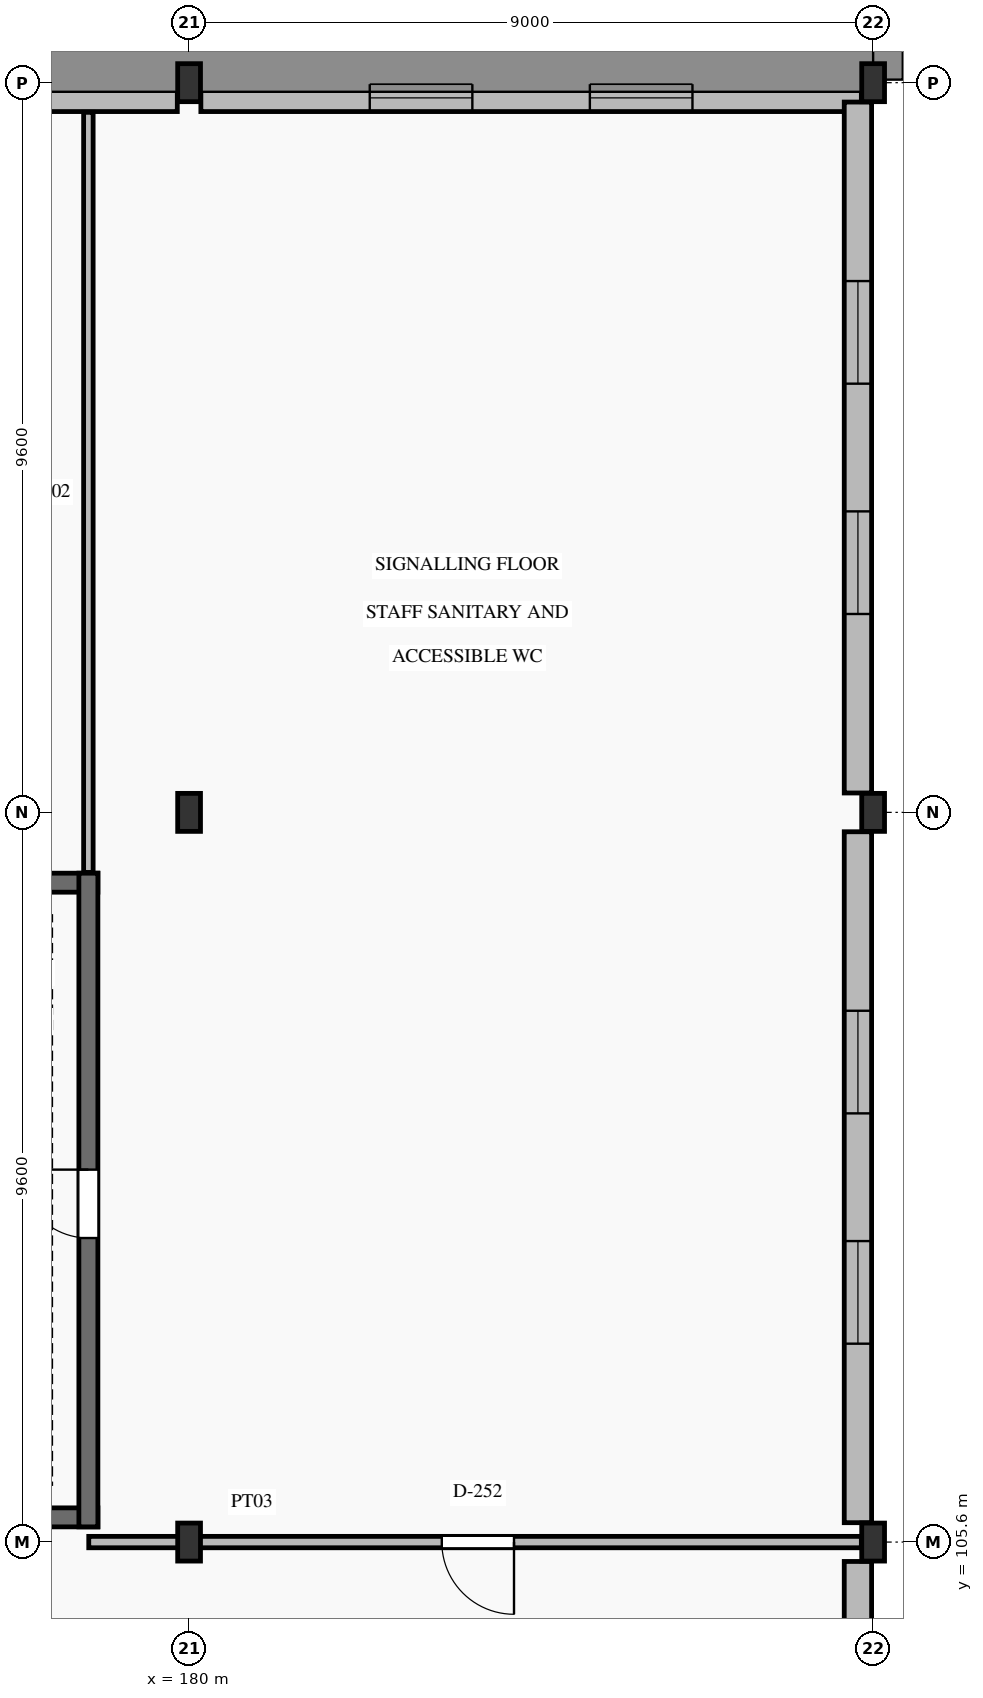
"""IFC4 building model, lengths in metres.
Left out: names, types, materials, properties, quantities, classifications, styles, units other than length and angle.
Written with IfcOpenShell. Run it as: python <this file> out.ifc"""

import sys

from ifc_helpers import new_model, si_unit, direction, frame, frame_2d, origin, origin_2d, place, context, subcontext, project, spatial, rectangle, i_section, extrude, element, fill, save


model = new_model("IFC4")
c1 = context("Model", 3, precision=1e-05, world=origin(), true_north=direction((0.0, 1.0)))
c2 = subcontext(c1, "Body", "Model", "MODEL_VIEW")
j1 = project(units=[si_unit("LENGTHUNIT", "METRE"), si_unit("PLANEANGLEUNIT", "RADIAN")], contexts=[c1])
p1 = place(None, origin())
s1 = spatial("IfcSite", under=j1, at=p1, CompositionType="ELEMENT")
p2 = place(p1, origin())
s2 = spatial("IfcBuilding", under=s1, at=p2, CompositionType="ELEMENT")
p3 = place(p2, frame((0.0, 0.0, 6.0)))
s3 = spatial("IfcBuildingStorey", under=s2, at=p3, CompositionType="ELEMENT", Elevation=6.0)
for number, where, z_axis, x_axis in (
    (1, (180.0, 105.6, 0.0), (0.0, 0.0, 1.0), (1.0, 0.0, 0.0)),
    (2, (180.0, 115.2, 0.0), (0.0, 0.0, 1.0), (1.0, 0.0, 0.0)),
    (3, (180.0, 124.8, 0.0), (0.0, 0.0, 1.0), (1.0, 0.0, 0.0)),
    (4, (189.0, 105.6, 0.0), (0.0, 0.0, 1.0), (1.0, 0.0, 0.0)),
    (5, (189.0, 115.2, 0.0), (0.0, 0.0, 1.0), (1.0, 0.0, 0.0)),
    (6, (189.0, 124.8, 0.0), (0.0, 0.0, 1.0), (1.0, 0.0, 0.0)),
):
    element("IfcColumn", number, at=place(p3, frame(where, z_axis=z_axis, x_axis=x_axis)), inside=s3, PredefinedType="COLUMN", context=c2, shape_type="SweptSolid", body=[
        extrude(i_section(OverallWidth=0.3, OverallDepth=0.5, WebThickness=0.014, FlangeThickness=0.028, FilletRadius=0.027, at=origin_2d()), origin(), (0.0, 0.0, 1.0), 4.8),
    ])
p4 = place(p3, frame((171.155, 124.6, 0.0), z_axis=(0.0, 0.0, 1.0), x_axis=(1.0, 0.0, 0.0)))
e7 = element("IfcWall", 7, at=p4, inside=s3, PredefinedType="SOLIDWALL", context=c2, shape_type="SweptSolid", body=[
    extrude(rectangle(XDim=8.69, YDim=0.36, at=frame_2d((4.345, 0.0))), origin(), (0.0, 0.0, 1.0), 4.23),
])
p5 = place(p4, frame((2.222, 0.0, 0.95)))
e8 = element("IfcOpeningElement", 8, at=p5, cuts=e7, PredefinedType="OPENING", context=c2, shape_type="SweptSolid", body=[
    extrude(rectangle(XDim=1.35, YDim=1.95, at=frame_2d((0.675, 0.975))), frame((0.0, 0.195, 0.0), z_axis=(0.0, -1.0, 0.0), x_axis=(1.0, 0.0, 0.0)), (0.0, 0.0, 1.0), 0.39),
])
p6 = place(p4, frame((5.118, 0.0, 0.95)))
e9 = element("IfcOpeningElement", 9, at=p6, cuts=e7, PredefinedType="OPENING", context=c2, shape_type="SweptSolid", body=[
    extrude(rectangle(XDim=1.35, YDim=1.95, at=frame_2d((0.675, 0.975))), frame((0.0, 0.195, 0.0), z_axis=(0.0, -1.0, 0.0), x_axis=(1.0, 0.0, 0.0)), (0.0, 0.0, 1.0), 0.39),
])
p7 = place(p3, frame((180.155, 124.6, 0.0), z_axis=(0.0, 0.0, 1.0), x_axis=(1.0, 0.0, 0.0)))
e10 = element("IfcWall", 10, at=p7, inside=s3, PredefinedType="SOLIDWALL", context=c2, shape_type="SweptSolid", body=[
    extrude(rectangle(XDim=8.69, YDim=0.36, at=frame_2d((4.345, 0.0))), origin(), (0.0, 0.0, 1.0), 4.23),
])
p8 = place(p7, frame((2.222, 0.0, 0.95)))
e11 = element("IfcOpeningElement", 11, at=p8, cuts=e10, PredefinedType="OPENING", context=c2, shape_type="SweptSolid", body=[
    extrude(rectangle(XDim=1.35, YDim=1.95, at=frame_2d((0.675, 0.975))), frame((0.0, 0.195, 0.0), z_axis=(0.0, -1.0, 0.0), x_axis=(1.0, 0.0, 0.0)), (0.0, 0.0, 1.0), 0.39),
])
p9 = place(p7, frame((5.118, 0.0, 0.95)))
e12 = element("IfcOpeningElement", 12, at=p9, cuts=e10, PredefinedType="OPENING", context=c2, shape_type="SweptSolid", body=[
    extrude(rectangle(XDim=1.35, YDim=1.95, at=frame_2d((0.675, 0.975))), frame((0.0, 0.195, 0.0), z_axis=(0.0, -1.0, 0.0), x_axis=(1.0, 0.0, 0.0)), (0.0, 0.0, 1.0), 0.39),
])
p10 = place(p3, frame((188.8, 96.255, 0.0), z_axis=(0.0, 0.0, 1.0), x_axis=(0.0, 1.0, 0.0)))
e13 = element("IfcWall", 13, at=p10, inside=s3, PredefinedType="SOLIDWALL", context=c2, shape_type="SweptSolid", body=[
    extrude(rectangle(XDim=9.09, YDim=0.36, at=frame_2d((4.545, 0.0))), origin(), (0.0, 0.0, 1.0), 4.28),
])
p11 = place(p10, frame((2.355, 0.0, 0.95)))
e14 = element("IfcOpeningElement", 14, at=p11, cuts=e13, PredefinedType="OPENING", context=c2, shape_type="SweptSolid", body=[
    extrude(rectangle(XDim=1.35, YDim=1.95, at=frame_2d((0.675, 0.975))), frame((0.0, 0.195, 0.0), z_axis=(0.0, -1.0, 0.0), x_axis=(1.0, 0.0, 0.0)), (0.0, 0.0, 1.0), 0.39),
])
p12 = place(p10, frame((5.385, 0.0, 0.95)))
e15 = element("IfcOpeningElement", 15, at=p12, cuts=e13, PredefinedType="OPENING", context=c2, shape_type="SweptSolid", body=[
    extrude(rectangle(XDim=1.35, YDim=1.95, at=frame_2d((0.675, 0.975))), frame((0.0, 0.195, 0.0), z_axis=(0.0, -1.0, 0.0), x_axis=(1.0, 0.0, 0.0)), (0.0, 0.0, 1.0), 0.39),
])
p13 = place(p3, frame((188.8, 105.855, 0.0), z_axis=(0.0, 0.0, 1.0), x_axis=(0.0, 1.0, 0.0)))
e16 = element("IfcWall", 16, at=p13, inside=s3, PredefinedType="SOLIDWALL", context=c2, shape_type="SweptSolid", body=[
    extrude(rectangle(XDim=9.09, YDim=0.36, at=frame_2d((4.545, 0.0))), origin(), (0.0, 0.0, 1.0), 4.28),
])
p14 = place(p13, frame((2.355, 0.0, 0.95)))
e17 = element("IfcOpeningElement", 17, at=p14, cuts=e16, PredefinedType="OPENING", context=c2, shape_type="SweptSolid", body=[
    extrude(rectangle(XDim=1.35, YDim=1.95, at=frame_2d((0.675, 0.975))), frame((0.0, 0.195, 0.0), z_axis=(0.0, -1.0, 0.0), x_axis=(1.0, 0.0, 0.0)), (0.0, 0.0, 1.0), 0.39),
])
p15 = place(p13, frame((5.385, 0.0, 0.95)))
e18 = element("IfcOpeningElement", 18, at=p15, cuts=e16, PredefinedType="OPENING", context=c2, shape_type="SweptSolid", body=[
    extrude(rectangle(XDim=1.35, YDim=1.95, at=frame_2d((0.675, 0.975))), frame((0.0, 0.195, 0.0), z_axis=(0.0, -1.0, 0.0), x_axis=(1.0, 0.0, 0.0)), (0.0, 0.0, 1.0), 0.39),
])
p16 = place(p3, frame((188.8, 115.455, 0.0), z_axis=(0.0, 0.0, 1.0), x_axis=(0.0, 1.0, 0.0)))
e19 = element("IfcWall", 19, at=p16, inside=s3, PredefinedType="SOLIDWALL", context=c2, shape_type="SweptSolid", body=[
    extrude(rectangle(XDim=9.09, YDim=0.36, at=frame_2d((4.545, 0.0))), origin(), (0.0, 0.0, 1.0), 4.28),
])
p17 = place(p16, frame((2.355, 0.0, 0.95)))
e20 = element("IfcOpeningElement", 20, at=p17, cuts=e19, PredefinedType="OPENING", context=c2, shape_type="SweptSolid", body=[
    extrude(rectangle(XDim=1.35, YDim=1.95, at=frame_2d((0.675, 0.975))), frame((0.0, 0.195, 0.0), z_axis=(0.0, -1.0, 0.0), x_axis=(1.0, 0.0, 0.0)), (0.0, 0.0, 1.0), 0.39),
])
p18 = place(p16, frame((5.385, 0.0, 0.95)))
e21 = element("IfcOpeningElement", 21, at=p18, cuts=e19, PredefinedType="OPENING", context=c2, shape_type="SweptSolid", body=[
    extrude(rectangle(XDim=1.35, YDim=1.95, at=frame_2d((0.675, 0.975))), frame((0.0, 0.195, 0.0), z_axis=(0.0, -1.0, 0.0), x_axis=(1.0, 0.0, 0.0)), (0.0, 0.0, 1.0), 0.39),
])
for number, where, z_axis, x_axis in (
    (22, (171.8, 105.925, 0.0), (0.0, 0.0, 1.0), (1.0, 0.0, 0.0)),
    (23, (171.8, 114.275, 0.0), (0.0, 0.0, 1.0), (1.0, 0.0, 0.0)),
):
    element("IfcWall", number, at=place(p3, frame(where, z_axis=z_axis, x_axis=x_axis)), inside=s3, PredefinedType="SHEAR", context=c2, shape_type="SweptSolid", body=[
        extrude(rectangle(XDim=7.0, YDim=0.25, at=frame_2d((3.5, 0.0))), origin(), (0.0, 0.0, 1.0), 4.8),
    ])
p19 = place(p3, frame((178.675, 105.8, 0.0), z_axis=(0.0, 0.0, 1.0), x_axis=(0.0, 1.0, 0.0)))
e24 = element("IfcWall", 24, at=p19, inside=s3, PredefinedType="SHEAR", context=c2, shape_type="SweptSolid", body=[
    extrude(rectangle(XDim=8.6, YDim=0.25, at=frame_2d((4.3, 0.0))), origin(), (0.0, 0.0, 1.0), 4.8),
])
p20 = place(p19, frame((3.8, 0.0, 0.0)))
e25 = element("IfcOpeningElement", 25, at=p20, cuts=e24, PredefinedType="OPENING", context=c2, shape_type="SweptSolid", body=[
    extrude(rectangle(XDim=0.9, YDim=2.05, at=frame_2d((0.45, 1.025))), frame((0.0, 0.14, 0.0), z_axis=(0.0, -1.0, 0.0), x_axis=(1.0, 0.0, 0.0)), (0.0, 0.0, 1.0), 0.28),
])
p21 = place(p3, frame((178.68, 105.6, 0.0), z_axis=(0.0, 0.0, 1.0), x_axis=(1.0, 0.0, 0.0)))
e26 = element("IfcWall", 26, at=p21, inside=s3, PredefinedType="PARTITIONING", context=c2, shape_type="SweptSolid", body=[
    extrude(rectangle(XDim=10.165, YDim=0.15, at=frame_2d((5.083, 0.0))), origin(), (0.0, 0.0, 1.0), 4.23),
])
p22 = place(p21, frame((4.645, 0.0, 0.0)))
e27 = element("IfcOpeningElement", 27, at=p22, cuts=e26, PredefinedType="OPENING", context=c2, shape_type="SweptSolid", body=[
    extrude(rectangle(XDim=0.95, YDim=2.1, at=frame_2d((0.475, 1.05))), frame((0.0, 0.09, 0.0), z_axis=(0.0, -1.0, 0.0), x_axis=(1.0, 0.0, 0.0)), (0.0, 0.0, 1.0), 0.18),
])
p23 = place(p3, frame((178.675, 114.41, 0.0), z_axis=(0.0, 0.0, 1.0), x_axis=(0.0, 1.0, 0.0)))
e28 = element("IfcWall", 28, at=p23, inside=s3, PredefinedType="PARTITIONING", context=c2, shape_type="SweptSolid", body=[
    extrude(rectangle(XDim=10.0, YDim=0.125, at=frame_2d((5.0, 0.0))), origin(), (0.0, 0.0, 1.0), 4.53),
])
p24 = place(p8, origin())
e29 = element("IfcWindow", 29, at=p24, inside=s3, PartitioningType="SINGLE_PANEL", PredefinedType="WINDOW", context=c2, shape_type="SweptSolid", body=[
    extrude(rectangle(XDim=1.35, YDim=1.95, at=frame_2d((0.675, 0.975))), frame((0.0, 0.03, 0.0), z_axis=(0.0, -1.0, 0.0), x_axis=(1.0, 0.0, 0.0)), (0.0, 0.0, 1.0), 0.06),
])
fill(e11, e29)
p25 = place(p9, origin())
e30 = element("IfcWindow", 30, at=p25, inside=s3, PartitioningType="SINGLE_PANEL", PredefinedType="WINDOW", context=c2, shape_type="SweptSolid", body=[
    extrude(rectangle(XDim=1.35, YDim=1.95, at=frame_2d((0.675, 0.975))), frame((0.0, 0.03, 0.0), z_axis=(0.0, -1.0, 0.0), x_axis=(1.0, 0.0, 0.0)), (0.0, 0.0, 1.0), 0.06),
])
fill(e12, e30)
p26 = place(p14, origin())
e31 = element("IfcWindow", 31, at=p26, inside=s3, PartitioningType="SINGLE_PANEL", PredefinedType="WINDOW", context=c2, shape_type="SweptSolid", body=[
    extrude(rectangle(XDim=1.35, YDim=1.95, at=frame_2d((0.675, 0.975))), frame((0.0, 0.03, 0.0), z_axis=(0.0, -1.0, 0.0), x_axis=(1.0, 0.0, 0.0)), (0.0, 0.0, 1.0), 0.06),
])
fill(e17, e31)
p27 = place(p15, origin())
e32 = element("IfcWindow", 32, at=p27, inside=s3, PartitioningType="SINGLE_PANEL", PredefinedType="WINDOW", context=c2, shape_type="SweptSolid", body=[
    extrude(rectangle(XDim=1.35, YDim=1.95, at=frame_2d((0.675, 0.975))), frame((0.0, 0.03, 0.0), z_axis=(0.0, -1.0, 0.0), x_axis=(1.0, 0.0, 0.0)), (0.0, 0.0, 1.0), 0.06),
])
fill(e18, e32)
p28 = place(p17, origin())
e33 = element("IfcWindow", 33, at=p28, inside=s3, PartitioningType="SINGLE_PANEL", PredefinedType="WINDOW", context=c2, shape_type="SweptSolid", body=[
    extrude(rectangle(XDim=1.35, YDim=1.95, at=frame_2d((0.675, 0.975))), frame((0.0, 0.03, 0.0), z_axis=(0.0, -1.0, 0.0), x_axis=(1.0, 0.0, 0.0)), (0.0, 0.0, 1.0), 0.06),
])
fill(e20, e33)
p29 = place(p18, origin())
e34 = element("IfcWindow", 34, at=p29, inside=s3, PartitioningType="SINGLE_PANEL", PredefinedType="WINDOW", context=c2, shape_type="SweptSolid", body=[
    extrude(rectangle(XDim=1.35, YDim=1.95, at=frame_2d((0.675, 0.975))), frame((0.0, 0.03, 0.0), z_axis=(0.0, -1.0, 0.0), x_axis=(1.0, 0.0, 0.0)), (0.0, 0.0, 1.0), 0.06),
])
fill(e21, e34)
p30 = place(p20, origin())
e35 = element("IfcDoor", 35, at=p30, inside=s3, OperationType="SINGLE_SWING_RIGHT", PredefinedType="DOOR", context=c2, shape_type="SweptSolid", body=[
    extrude(rectangle(XDim=0.9, YDim=2.05, at=frame_2d((0.45, 1.025))), frame((0.0, 0.025, 0.0), z_axis=(0.0, -1.0, 0.0), x_axis=(1.0, 0.0, 0.0)), (0.0, 0.0, 1.0), 0.05),
])
fill(e25, e35)
p31 = place(p22, frame((0.95, 0.0, 0.0), z_axis=(0.0, 0.0, 1.0), x_axis=(-1.0, 0.0, 0.0)))
e36 = element("IfcDoor", 36, at=p31, inside=s3, OperationType="SINGLE_SWING_RIGHT", PredefinedType="DOOR", context=c2, shape_type="SweptSolid", body=[
    extrude(rectangle(XDim=0.95, YDim=2.1, at=frame_2d((0.475, 1.05))), frame((0.0, 0.025, 0.0), z_axis=(0.0, -1.0, 0.0), x_axis=(1.0, 0.0, 0.0)), (0.0, 0.0, 1.0), 0.05),
])
fill(e27, e36)
save(model, sys.argv[1])
